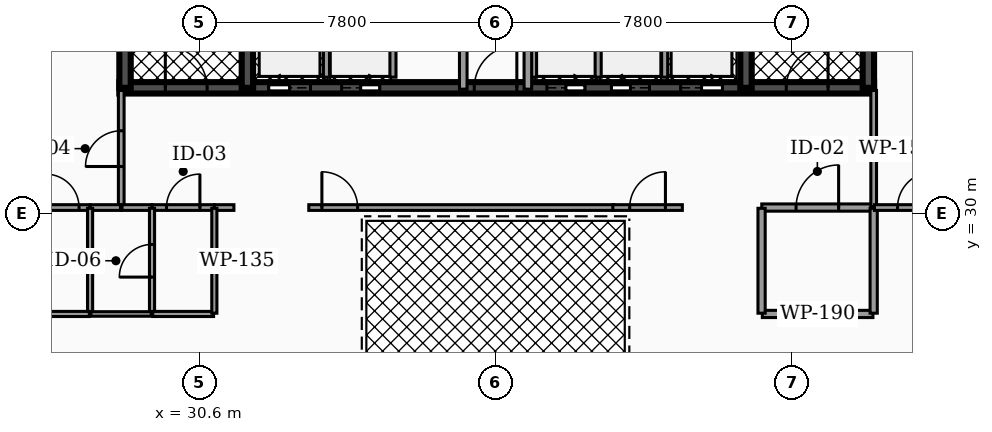
"""IFC4 building model, lengths in metres.
Left out: names, types, materials, properties, quantities, classifications, styles, units other than length and angle.
Written with IfcOpenShell. Run it as: python <this file> out.ifc"""

import sys

from ifc_helpers import new_model, si_unit, direction, frame, frame_2d, origin, place, context, subcontext, project, spatial, rectangle, extrude, element, fill, save


model = new_model("IFC4")
c1 = context("Model", 3, precision=1e-05, world=origin(), true_north=direction((0.0, 1.0)))
c2 = subcontext(c1, "Body", "Model", "MODEL_VIEW")
j1 = project(units=[si_unit("LENGTHUNIT", "METRE"), si_unit("PLANEANGLEUNIT", "RADIAN")], contexts=[c1])
p1 = place(None, origin())
s1 = spatial("IfcSite", under=j1, at=p1, CompositionType="ELEMENT")
p2 = place(p1, origin())
s2 = spatial("IfcBuilding", under=s1, at=p2, CompositionType="ELEMENT")
p3 = place(p2, frame((0.0, 0.0, 225.76)))
s3 = spatial("IfcBuildingStorey", under=s2, at=p3, CompositionType="ELEMENT", Elevation=225.76)
p4 = place(p3, frame((28.5, 33.3, 0.0), z_axis=(0.0, 0.0, 1.0), x_axis=(1.0, 0.0, 0.0)))
e1 = element("IfcWall", 1, at=p4, inside=s3, PredefinedType="SHEAR", context=c2, shape_type="SweptSolid", body=[
    extrude(rectangle(XDim=19.86, YDim=0.3, at=frame_2d((9.93, 0.0))), origin(), (0.0, 0.0, 1.0), 3.18),
])
p5 = place(p4, frame((3.93, 0.0, 0.0)))
e2 = element("IfcOpeningElement", 2, at=p5, cuts=e1, PredefinedType="OPENING", context=c2, shape_type="SweptSolid", body=[
    extrude(rectangle(XDim=1.1, YDim=2.15, at=frame_2d((0.55, 1.075))), frame((0.0, 0.16, 0.0), z_axis=(0.0, -1.0, 0.0), x_axis=(1.0, 0.0, 0.0)), (0.0, 0.0, 1.0), 0.32),
])
p6 = place(p4, frame((14.77, 0.0, 0.0)))
e3 = element("IfcOpeningElement", 3, at=p6, cuts=e1, PredefinedType="OPENING", context=c2, shape_type="SweptSolid", body=[
    extrude(rectangle(XDim=1.1, YDim=2.15, at=frame_2d((0.55, 1.075))), frame((0.0, 0.16, 0.0), z_axis=(0.0, -1.0, 0.0), x_axis=(1.0, 0.0, 0.0)), (0.0, 0.0, 1.0), 0.32),
])
p7 = place(p4, frame((11.25, 0.0, 0.0)))
e4 = element("IfcOpeningElement", 4, at=p7, cuts=e1, PredefinedType="OPENING", context=c2, shape_type="SweptSolid", body=[
    extrude(rectangle(XDim=1.0, YDim=2.1, at=frame_2d((0.5, 1.05))), frame((0.0, 0.16, 0.0), z_axis=(0.0, -1.0, 0.0), x_axis=(1.0, 0.0, 0.0)), (0.0, 0.0, 1.0), 0.32),
])
p8 = place(p4, frame((12.95, 0.0, 0.0)))
e5 = element("IfcOpeningElement", 5, at=p8, cuts=e1, PredefinedType="OPENING", context=c2, shape_type="SweptSolid", body=[
    extrude(rectangle(XDim=1.0, YDim=2.1, at=frame_2d((0.5, 1.05))), frame((0.0, 0.16, 0.0), z_axis=(0.0, -1.0, 0.0), x_axis=(1.0, 0.0, 0.0)), (0.0, 0.0, 1.0), 0.32),
])
p9 = place(p4, frame((5.85, 0.0, 0.0)))
e6 = element("IfcOpeningElement", 6, at=p9, cuts=e1, PredefinedType="OPENING", context=c2, shape_type="SweptSolid", body=[
    extrude(rectangle(XDim=1.0, YDim=2.1, at=frame_2d((0.5, 1.05))), frame((0.0, 0.16, 0.0), z_axis=(0.0, -1.0, 0.0), x_axis=(1.0, 0.0, 0.0)), (0.0, 0.0, 1.0), 0.32),
])
p10 = place(p4, frame((1.21, 0.0, 0.0)))
e7 = element("IfcOpeningElement", 7, at=p10, cuts=e1, PredefinedType="OPENING", context=c2, shape_type="SweptSolid", body=[
    extrude(rectangle(XDim=1.1, YDim=2.2, at=frame_2d((0.55, 1.1))), frame((0.0, 0.16, 0.0), z_axis=(0.0, -1.0, 0.0), x_axis=(1.0, 0.0, 0.0)), (0.0, 0.0, 1.0), 0.32),
])
p11 = place(p4, frame((9.34, 0.0, 0.0)))
e8 = element("IfcOpeningElement", 8, at=p11, cuts=e1, PredefinedType="OPENING", context=c2, shape_type="SweptSolid", body=[
    extrude(rectangle(XDim=1.12, YDim=2.05, at=frame_2d((0.56, 1.025))), frame((0.0, 0.16, 0.0), z_axis=(0.0, -1.0, 0.0), x_axis=(1.0, 0.0, 0.0)), (0.0, 0.0, 1.0), 0.32),
])
p12 = place(p4, frame((17.55, 0.0, 0.0)))
e9 = element("IfcOpeningElement", 9, at=p12, cuts=e1, PredefinedType="OPENING", context=c2, shape_type="SweptSolid", body=[
    extrude(rectangle(XDim=1.1, YDim=2.2, at=frame_2d((0.55, 1.1))), frame((0.0, 0.16, 0.0), z_axis=(0.0, -1.0, 0.0), x_axis=(1.0, 0.0, 0.0)), (0.0, 0.0, 1.0), 0.32),
])
for number, where, z_axis, x_axis in (
    (10, (28.65, 33.3, 0.0), (0.0, 0.0, 1.0), (0.0, 1.0, 0.0)),
    (11, (31.87, 33.3, 0.0), (0.0, 0.0, 1.0), (0.0, 1.0, 0.0)),
    (12, (44.99, 33.3, 0.0), (0.0, 0.0, 1.0), (0.0, 1.0, 0.0)),
    (13, (48.21, 33.3, 0.0), (0.0, 0.0, 1.0), (0.0, 1.0, 0.0)),
):
    element("IfcWall", number, at=place(p3, frame(where, z_axis=z_axis, x_axis=x_axis)), inside=s3, PredefinedType="SHEAR", context=c2, shape_type="SweptSolid", body=[
        extrude(rectangle(XDim=10.1, YDim=0.3, at=frame_2d((5.05, 0.0))), origin(), (0.0, 0.0, 1.0), 3.18),
    ])
for number, where, z_axis, x_axis in (
    (14, (33.95, 33.58, 0.0), (0.0, 0.0, 1.0), (0.0, 1.0, 0.0)),
    (15, (42.85, 33.58, 0.0), (0.0, 0.0, 1.0), (0.0, 1.0, 0.0)),
):
    element("IfcWall", number, at=place(p3, frame(where, z_axis=z_axis, x_axis=x_axis)), inside=s3, PredefinedType="SOLIDWALL", context=c2, shape_type="SweptSolid", body=[
        extrude(rectangle(XDim=2.45, YDim=0.16, at=frame_2d((1.225, 0.0))), origin(), (0.0, 0.0, 1.0), 3.18),
    ])
for number, where, z_axis, x_axis in (
    (16, (39.4, 33.58, 0.0), (0.0, 0.0, 1.0), (0.0, 1.0, 0.0)),
    (17, (41.1, 33.58, 0.0), (0.0, 0.0, 1.0), (0.0, 1.0, 0.0)),
    (18, (35.7, 33.58, 0.0), (0.0, 0.0, 1.0), (0.0, 1.0, 0.0)),
):
    element("IfcWall", number, at=place(p3, frame(where, z_axis=z_axis, x_axis=x_axis)), inside=s3, PredefinedType="SOLIDWALL", context=c2, shape_type="SweptSolid", body=[
        extrude(rectangle(XDim=2.25, YDim=0.16, at=frame_2d((1.125, 0.0))), origin(), (0.0, 0.0, 1.0), 3.18),
    ])
p13 = place(p3, frame((37.55, 33.265, 0.0), z_axis=(0.0, 0.0, 1.0), x_axis=(0.0, 1.0, 0.0)))
e19 = element("IfcWall", 19, at=p13, inside=s3, PredefinedType="PARTITIONING", context=c2, shape_type="SweptSolid", body=[
    extrude(rectangle(XDim=3.615, YDim=0.2, at=frame_2d((1.808, 0.0))), origin(), (0.0, 0.0, 1.0), 2.235),
])
p14 = place(p13, frame((1.367, 0.0, 0.0)))
e20 = element("IfcOpeningElement", 20, at=p14, cuts=e19, PredefinedType="OPENING", context=c2, shape_type="SweptSolid", body=[
    extrude(rectangle(XDim=0.88, YDim=2.05, at=frame_2d((0.44, 1.025))), frame((0.0, 0.11, 0.0), z_axis=(0.0, -1.0, 0.0), x_axis=(1.0, 0.0, 0.0)), (0.0, 0.0, 1.0), 0.22),
])
p15 = place(p3, frame((39.25, 33.265, 0.0), z_axis=(0.0, 0.0, 1.0), x_axis=(0.0, 1.0, 0.0)))
e21 = element("IfcWall", 21, at=p15, inside=s3, PredefinedType="PARTITIONING", context=c2, shape_type="SweptSolid", body=[
    extrude(rectangle(XDim=3.615, YDim=0.2, at=frame_2d((1.808, 0.0))), origin(), (0.0, 0.0, 1.0), 2.235),
])
p16 = place(p3, frame((45.405, 30.15, 0.0), z_axis=(0.0, 0.0, 1.0), x_axis=(1.0, 0.0, 0.0)))
e22 = element("IfcWall", 22, at=p16, inside=s3, PredefinedType="PARTITIONING", context=c2, shape_type="SweptSolid", body=[
    extrude(rectangle(XDim=2.925, YDim=0.19, at=frame_2d((1.462, 0.0))), origin(), (0.0, 0.0, 1.0), 2.235),
])
p17 = place(p16, frame((0.903, 0.0, 0.0)))
e23 = element("IfcOpeningElement", 23, at=p17, cuts=e22, PredefinedType="OPENING", context=c2, shape_type="SweptSolid", body=[
    extrude(rectangle(XDim=1.12, YDim=2.05, at=frame_2d((0.56, 1.025))), frame((0.0, 0.105, 0.0), z_axis=(0.0, -1.0, 0.0), x_axis=(1.0, 0.0, 0.0)), (0.0, 0.0, 1.0), 0.21),
])
p18 = place(p3, frame((28.55, 30.17, 0.0), z_axis=(0.0, 0.0, 1.0), x_axis=(0.0, 1.0, 0.0)))
e24 = element("IfcWall", 24, at=p18, inside=s3, PredefinedType="PARTITIONING", context=c2, shape_type="SweptSolid", body=[
    extrude(rectangle(XDim=3.06, YDim=0.15, at=frame_2d((1.53, 0.0))), origin(), (0.0, 0.0, 1.0), 2.235),
])
p19 = place(p18, frame((1.06, 0.0, 0.0)))
e25 = element("IfcOpeningElement", 25, at=p19, cuts=e24, PredefinedType="OPENING", context=c2, shape_type="SweptSolid", body=[
    extrude(rectangle(XDim=0.94, YDim=2.05, at=frame_2d((0.47, 1.025))), frame((0.0, 0.085, 0.0), z_axis=(0.0, -1.0, 0.0), x_axis=(1.0, 0.0, 0.0)), (0.0, 0.0, 1.0), 0.17),
])
p20 = place(p3, frame((48.35, 30.17, 0.0), z_axis=(0.0, 0.0, 1.0), x_axis=(0.0, 1.0, 0.0)))
e26 = element("IfcWall", 26, at=p20, inside=s3, PredefinedType="PARTITIONING", context=c2, shape_type="SweptSolid", body=[
    extrude(rectangle(XDim=3.06, YDim=0.15, at=frame_2d((1.53, 0.0))), origin(), (0.0, 0.0, 1.0), 2.235),
])
p21 = place(p3, frame((29.365, 30.15, 0.0), z_axis=(0.0, 0.0, 1.0), x_axis=(1.0, 0.0, 0.0)))
e27 = element("IfcWall", 27, at=p21, inside=s3, PredefinedType="PARTITIONING", context=c2, shape_type="SweptSolid", body=[
    extrude(rectangle(XDim=1.63, YDim=0.15, at=frame_2d((0.815, 0.0))), origin(), (0.0, 0.0, 1.0), 2.235),
])
p22 = place(p21, frame((0.375, 0.0, 0.0)))
e28 = element("IfcOpeningElement", 28, at=p22, cuts=e27, PredefinedType="OPENING", context=c2, shape_type="SweptSolid", body=[
    extrude(rectangle(XDim=0.88, YDim=2.05, at=frame_2d((0.44, 1.025))), frame((0.0, 0.085, 0.0), z_axis=(0.0, -1.0, 0.0), x_axis=(1.0, 0.0, 0.0)), (0.0, 0.0, 1.0), 0.17),
])
p23 = place(p3, frame((28.57, 30.15, 0.0), z_axis=(0.0, 0.0, 1.0), x_axis=(1.0, 0.0, 0.0)))
e29 = element("IfcWall", 29, at=p23, inside=s3, PredefinedType="PARTITIONING", context=c2, shape_type="SweptSolid", body=[
    extrude(rectangle(XDim=0.785, YDim=0.15, at=frame_2d((0.393, 0.0))), origin(), (0.0, 0.0, 1.0), 2.235),
])
p24 = place(p3, frame((33.485, 30.15, 0.0), z_axis=(0.0, 0.0, 1.0), x_axis=(1.0, 0.0, 0.0)))
e30 = element("IfcWall", 30, at=p24, inside=s3, PredefinedType="PARTITIONING", context=c2, shape_type="SweptSolid", body=[
    extrude(rectangle(XDim=8.03, YDim=0.15, at=frame_2d((4.015, 0.0))), origin(), (0.0, 0.0, 1.0), 2.235),
])
p25 = place(p24, frame((0.345, 0.0, 0.0)))
e31 = element("IfcOpeningElement", 31, at=p25, cuts=e30, PredefinedType="OPENING", context=c2, shape_type="SweptSolid", body=[
    extrude(rectangle(XDim=0.94, YDim=2.05, at=frame_2d((0.47, 1.025))), frame((0.0, 0.085, 0.0), z_axis=(0.0, -1.0, 0.0), x_axis=(1.0, 0.0, 0.0)), (0.0, 0.0, 1.0), 0.17),
])
p26 = place(p3, frame((31.005, 30.15, 0.0), z_axis=(0.0, 0.0, 1.0), x_axis=(1.0, 0.0, 0.0)))
e32 = element("IfcWall", 32, at=p26, inside=s3, PredefinedType="PARTITIONING", context=c2, shape_type="SweptSolid", body=[
    extrude(rectangle(XDim=0.51, YDim=0.15, at=frame_2d((0.255, 0.0))), origin(), (0.0, 0.0, 1.0), 2.235),
])
p27 = place(p3, frame((41.485, 30.15, 0.0), z_axis=(0.0, 0.0, 1.0), x_axis=(1.0, 0.0, 0.0)))
e33 = element("IfcWall", 33, at=p27, inside=s3, PredefinedType="PARTITIONING", context=c2, shape_type="SweptSolid", body=[
    extrude(rectangle(XDim=1.83, YDim=0.15, at=frame_2d((0.915, 0.0))), origin(), (0.0, 0.0, 1.0), 2.235),
])
p28 = place(p27, frame((0.445, 0.0, 0.0)))
e34 = element("IfcOpeningElement", 34, at=p28, cuts=e33, PredefinedType="OPENING", context=c2, shape_type="SweptSolid", body=[
    extrude(rectangle(XDim=0.94, YDim=2.05, at=frame_2d((0.47, 1.025))), frame((0.0, 0.085, 0.0), z_axis=(0.0, -1.0, 0.0), x_axis=(1.0, 0.0, 0.0)), (0.0, 0.0, 1.0), 0.17),
])
p29 = place(p3, frame((45.42, 27.35, 0.0), z_axis=(0.0, 0.0, 1.0), x_axis=(1.0, 0.0, 0.0)))
e35 = element("IfcWall", 35, at=p29, inside=s3, PredefinedType="PARTITIONING", context=c2, shape_type="SweptSolid", body=[
    extrude(rectangle(XDim=2.91, YDim=0.19, at=frame_2d((1.455, 0.0))), origin(), (0.0, 0.0, 1.0), 2.235),
])
for number, where, z_axis, x_axis in (
    (36, (45.4, 27.37, 0.0), (0.0, 0.0, 1.0), (0.0, 1.0, 0.0)),
    (37, (48.35, 27.37, 0.0), (0.0, 0.0, 1.0), (0.0, 1.0, 0.0)),
):
    element("IfcWall", number, at=place(p3, frame(where, z_axis=z_axis, x_axis=x_axis)), inside=s3, PredefinedType="PARTITIONING", context=c2, shape_type="SweptSolid", body=[
        extrude(rectangle(XDim=2.76, YDim=0.19, at=frame_2d((1.38, 0.0))), origin(), (0.0, 0.0, 1.0), 2.235),
    ])
p30 = place(p3, frame((26.275, 30.15, 0.0), z_axis=(0.0, 0.0, 1.0), x_axis=(1.0, 0.0, 0.0)))
e38 = element("IfcWall", 38, at=p30, inside=s3, PredefinedType="PARTITIONING", context=c2, shape_type="SweptSolid", body=[
    extrude(rectangle(XDim=1.45, YDim=0.15, at=frame_2d((0.725, 0.0))), origin(), (0.0, 0.0, 1.0), 2.235),
])
p31 = place(p30, frame((0.285, 0.0, 0.0)))
e39 = element("IfcOpeningElement", 39, at=p31, cuts=e38, PredefinedType="OPENING", context=c2, shape_type="SweptSolid", body=[
    extrude(rectangle(XDim=0.88, YDim=2.05, at=frame_2d((0.44, 1.025))), frame((0.0, 0.085, 0.0), z_axis=(0.0, -1.0, 0.0), x_axis=(1.0, 0.0, 0.0)), (0.0, 0.0, 1.0), 0.17),
])
p32 = place(p3, frame((27.735, 30.15, 0.0), z_axis=(0.0, 0.0, 1.0), x_axis=(1.0, 0.0, 0.0)))
e40 = element("IfcWall", 40, at=p32, inside=s3, PredefinedType="PARTITIONING", context=c2, shape_type="SweptSolid", body=[
    extrude(rectangle(XDim=0.795, YDim=0.15, at=frame_2d((0.397, 0.0))), origin(), (0.0, 0.0, 1.0), 2.235),
])
p33 = place(p3, frame((48.37, 30.15, 0.0), z_axis=(0.0, 0.0, 1.0), x_axis=(1.0, 0.0, 0.0)))
e41 = element("IfcWall", 41, at=p33, inside=s3, PredefinedType="PARTITIONING", context=c2, shape_type="SweptSolid", body=[
    extrude(rectangle(XDim=2.155, YDim=0.15, at=frame_2d((1.078, 0.0))), origin(), (0.0, 0.0, 1.0), 2.235),
])
p34 = place(p33, frame((0.608, 0.0, 0.0)))
e42 = element("IfcOpeningElement", 42, at=p34, cuts=e41, PredefinedType="OPENING", context=c2, shape_type="SweptSolid", body=[
    extrude(rectangle(XDim=0.94, YDim=2.05, at=frame_2d((0.47, 1.025))), frame((0.0, 0.085, 0.0), z_axis=(0.0, -1.0, 0.0), x_axis=(1.0, 0.0, 0.0)), (0.0, 0.0, 1.0), 0.17),
])
p35 = place(p3, frame((29.36, 27.37, 0.0), z_axis=(0.0, 0.0, 1.0), x_axis=(0.0, 1.0, 0.0)))
e43 = element("IfcWall", 43, at=p35, inside=s3, PredefinedType="PARTITIONING", context=c2, shape_type="SweptSolid", body=[
    extrude(rectangle(XDim=2.76, YDim=0.135, at=frame_2d((1.38, 0.0))), origin(), (0.0, 0.0, 1.0), 2.235),
])
p36 = place(p35, frame((0.95, 0.0, 0.0)))
e44 = element("IfcOpeningElement", 44, at=p36, cuts=e43, PredefinedType="OPENING", context=c2, shape_type="SweptSolid", body=[
    extrude(rectangle(XDim=0.86, YDim=2.05, at=frame_2d((0.43, 1.025))), frame((0.0, 0.077, 0.0), z_axis=(0.0, -1.0, 0.0), x_axis=(1.0, 0.0, 0.0)), (0.0, 0.0, 1.0), 0.155),
])
p37 = place(p3, frame((29.38, 27.35, 0.0), z_axis=(0.0, 0.0, 1.0), x_axis=(1.0, 0.0, 0.0)))
e45 = element("IfcWall", 45, at=p37, inside=s3, PredefinedType="PARTITIONING", context=c2, shape_type="SweptSolid", body=[
    extrude(rectangle(XDim=1.6, YDim=0.135, at=frame_2d((0.8, 0.0))), origin(), (0.0, 0.0, 1.0), 2.235),
])
for number, where, z_axis, x_axis in (
    (46, (31.0, 27.37, 0.0), (0.0, 0.0, 1.0), (0.0, 1.0, 0.0)),
    (47, (27.73, 27.37, 0.0), (0.0, 0.0, 1.0), (0.0, 1.0, 0.0)),
):
    element("IfcWall", number, at=place(p3, frame(where, z_axis=z_axis, x_axis=x_axis)), inside=s3, PredefinedType="PARTITIONING", context=c2, shape_type="SweptSolid", body=[
        extrude(rectangle(XDim=2.76, YDim=0.135, at=frame_2d((1.38, 0.0))), origin(), (0.0, 0.0, 1.0), 2.235),
    ])
p38 = place(p3, frame((26.12, 27.35, 0.0), z_axis=(0.0, 0.0, 1.0), x_axis=(1.0, 0.0, 0.0)))
e48 = element("IfcWall", 48, at=p38, inside=s3, PredefinedType="PARTITIONING", context=c2, shape_type="SweptSolid", body=[
    extrude(rectangle(XDim=1.59, YDim=0.135, at=frame_2d((0.795, 0.0))), origin(), (0.0, 0.0, 1.0), 2.235),
])
p39 = place(p3, frame((27.75, 27.35, 0.0), z_axis=(0.0, 0.0, 1.0), x_axis=(1.0, 0.0, 0.0)))
e49 = element("IfcWall", 49, at=p39, inside=s3, PredefinedType="PARTITIONING", context=c2, shape_type="SweptSolid", body=[
    extrude(rectangle(XDim=1.59, YDim=0.12, at=frame_2d((0.795, 0.0))), origin(), (0.0, 0.0, 1.0), 2.235),
])
p40 = place(p5, origin())
e50 = element("IfcDoor", 50, at=p40, inside=s3, OperationType="SLIDING_TO_LEFT", PredefinedType="DOOR", context=c2, shape_type="SweptSolid", body=[
    extrude(rectangle(XDim=1.1, YDim=2.15, at=frame_2d((0.55, 1.075))), frame((0.0, 0.025, 0.0), z_axis=(0.0, -1.0, 0.0), x_axis=(1.0, 0.0, 0.0)), (0.0, 0.0, 1.0), 0.05),
])
fill(e2, e50)
p41 = place(p6, origin())
e51 = element("IfcDoor", 51, at=p41, inside=s3, OperationType="SLIDING_TO_RIGHT", PredefinedType="DOOR", context=c2, shape_type="SweptSolid", body=[
    extrude(rectangle(XDim=1.1, YDim=2.15, at=frame_2d((0.55, 1.075))), frame((0.0, 0.025, 0.0), z_axis=(0.0, -1.0, 0.0), x_axis=(1.0, 0.0, 0.0)), (0.0, 0.0, 1.0), 0.05),
])
fill(e3, e51)
p42 = place(p7, origin())
e52 = element("IfcDoor", 52, at=p42, inside=s3, OperationType="SLIDING_TO_RIGHT", PredefinedType="DOOR", context=c2, shape_type="SweptSolid", body=[
    extrude(rectangle(XDim=1.0, YDim=2.1, at=frame_2d((0.5, 1.05))), frame((0.0, 0.025, 0.0), z_axis=(0.0, -1.0, 0.0), x_axis=(1.0, 0.0, 0.0)), (0.0, 0.0, 1.0), 0.05),
])
fill(e4, e52)
p43 = place(p8, origin())
e53 = element("IfcDoor", 53, at=p43, inside=s3, OperationType="SLIDING_TO_LEFT", PredefinedType="DOOR", context=c2, shape_type="SweptSolid", body=[
    extrude(rectangle(XDim=1.0, YDim=2.1, at=frame_2d((0.5, 1.05))), frame((0.0, 0.025, 0.0), z_axis=(0.0, -1.0, 0.0), x_axis=(1.0, 0.0, 0.0)), (0.0, 0.0, 1.0), 0.05),
])
fill(e5, e53)
p44 = place(p9, origin())
e54 = element("IfcDoor", 54, at=p44, inside=s3, OperationType="SLIDING_TO_RIGHT", PredefinedType="DOOR", context=c2, shape_type="SweptSolid", body=[
    extrude(rectangle(XDim=1.0, YDim=2.1, at=frame_2d((0.5, 1.05))), frame((0.0, 0.025, 0.0), z_axis=(0.0, -1.0, 0.0), x_axis=(1.0, 0.0, 0.0)), (0.0, 0.0, 1.0), 0.05),
])
fill(e6, e54)
p45 = place(p10, origin())
e55 = element("IfcDoor", 55, at=p45, inside=s3, OperationType="SINGLE_SWING_LEFT", PredefinedType="DOOR", context=c2, shape_type="SweptSolid", body=[
    extrude(rectangle(XDim=1.1, YDim=2.2, at=frame_2d((0.55, 1.1))), frame((0.0, 0.025, 0.0), z_axis=(0.0, -1.0, 0.0), x_axis=(1.0, 0.0, 0.0)), (0.0, 0.0, 1.0), 0.05),
])
fill(e7, e55)
p46 = place(p11, origin())
e56 = element("IfcDoor", 56, at=p46, inside=s3, OperationType="SINGLE_SWING_RIGHT", PredefinedType="DOOR", context=c2, shape_type="SweptSolid", body=[
    extrude(rectangle(XDim=1.12, YDim=2.05, at=frame_2d((0.56, 1.025))), frame((0.0, 0.025, 0.0), z_axis=(0.0, -1.0, 0.0), x_axis=(1.0, 0.0, 0.0)), (0.0, 0.0, 1.0), 0.05),
])
fill(e8, e56)
p47 = place(p12, origin())
e57 = element("IfcDoor", 57, at=p47, inside=s3, OperationType="SINGLE_SWING_RIGHT", PredefinedType="DOOR", context=c2, shape_type="SweptSolid", body=[
    extrude(rectangle(XDim=1.1, YDim=2.2, at=frame_2d((0.55, 1.1))), frame((0.0, 0.025, 0.0), z_axis=(0.0, -1.0, 0.0), x_axis=(1.0, 0.0, 0.0)), (0.0, 0.0, 1.0), 0.05),
])
fill(e9, e57)
p48 = place(p17, origin())
e58 = element("IfcDoor", 58, at=p48, inside=s3, OperationType="SINGLE_SWING_RIGHT", PredefinedType="DOOR", context=c2, shape_type="SweptSolid", body=[
    extrude(rectangle(XDim=1.12, YDim=2.05, at=frame_2d((0.56, 1.025))), frame((0.0, 0.025, 0.0), z_axis=(0.0, -1.0, 0.0), x_axis=(1.0, 0.0, 0.0)), (0.0, 0.0, 1.0), 0.05),
])
fill(e23, e58)
p49 = place(p19, origin())
e59 = element("IfcDoor", 59, at=p49, inside=s3, OperationType="SINGLE_SWING_LEFT", PredefinedType="DOOR", context=c2, shape_type="SweptSolid", body=[
    extrude(rectangle(XDim=0.94, YDim=2.05, at=frame_2d((0.47, 1.025))), frame((0.0, 0.025, 0.0), z_axis=(0.0, -1.0, 0.0), x_axis=(1.0, 0.0, 0.0)), (0.0, 0.0, 1.0), 0.05),
])
fill(e25, e59)
p50 = place(p22, origin())
e60 = element("IfcDoor", 60, at=p50, inside=s3, OperationType="SINGLE_SWING_RIGHT", PredefinedType="DOOR", context=c2, shape_type="SweptSolid", body=[
    extrude(rectangle(XDim=0.88, YDim=2.05, at=frame_2d((0.44, 1.025))), frame((0.0, 0.025, 0.0), z_axis=(0.0, -1.0, 0.0), x_axis=(1.0, 0.0, 0.0)), (0.0, 0.0, 1.0), 0.05),
])
fill(e28, e60)
p51 = place(p25, origin())
e61 = element("IfcDoor", 61, at=p51, inside=s3, OperationType="SINGLE_SWING_LEFT", PredefinedType="DOOR", context=c2, shape_type="SweptSolid", body=[
    extrude(rectangle(XDim=0.94, YDim=2.05, at=frame_2d((0.47, 1.025))), frame((0.0, 0.025, 0.0), z_axis=(0.0, -1.0, 0.0), x_axis=(1.0, 0.0, 0.0)), (0.0, 0.0, 1.0), 0.05),
])
fill(e31, e61)
p52 = place(p28, origin())
e62 = element("IfcDoor", 62, at=p52, inside=s3, OperationType="SINGLE_SWING_RIGHT", PredefinedType="DOOR", context=c2, shape_type="SweptSolid", body=[
    extrude(rectangle(XDim=0.94, YDim=2.05, at=frame_2d((0.47, 1.025))), frame((0.0, 0.025, 0.0), z_axis=(0.0, -1.0, 0.0), x_axis=(1.0, 0.0, 0.0)), (0.0, 0.0, 1.0), 0.05),
])
fill(e34, e62)
p53 = place(p31, origin())
e63 = element("IfcDoor", 63, at=p53, inside=s3, OperationType="SINGLE_SWING_LEFT", PredefinedType="DOOR", context=c2, shape_type="SweptSolid", body=[
    extrude(rectangle(XDim=0.88, YDim=2.05, at=frame_2d((0.44, 1.025))), frame((0.0, 0.025, 0.0), z_axis=(0.0, -1.0, 0.0), x_axis=(1.0, 0.0, 0.0)), (0.0, 0.0, 1.0), 0.05),
])
fill(e39, e63)
p54 = place(p34, origin())
e64 = element("IfcDoor", 64, at=p54, inside=s3, OperationType="SINGLE_SWING_RIGHT", PredefinedType="DOOR", context=c2, shape_type="SweptSolid", body=[
    extrude(rectangle(XDim=0.94, YDim=2.05, at=frame_2d((0.47, 1.025))), frame((0.0, 0.025, 0.0), z_axis=(0.0, -1.0, 0.0), x_axis=(1.0, 0.0, 0.0)), (0.0, 0.0, 1.0), 0.05),
])
fill(e42, e64)
p55 = place(p36, origin())
e65 = element("IfcDoor", 65, at=p55, inside=s3, OperationType="SINGLE_SWING_LEFT", PredefinedType="DOOR", context=c2, shape_type="SweptSolid", body=[
    extrude(rectangle(XDim=0.86, YDim=2.05, at=frame_2d((0.43, 1.025))), frame((0.0, 0.025, 0.0), z_axis=(0.0, -1.0, 0.0), x_axis=(1.0, 0.0, 0.0)), (0.0, 0.0, 1.0), 0.05),
])
fill(e44, e65)
save(model, sys.argv[1])
